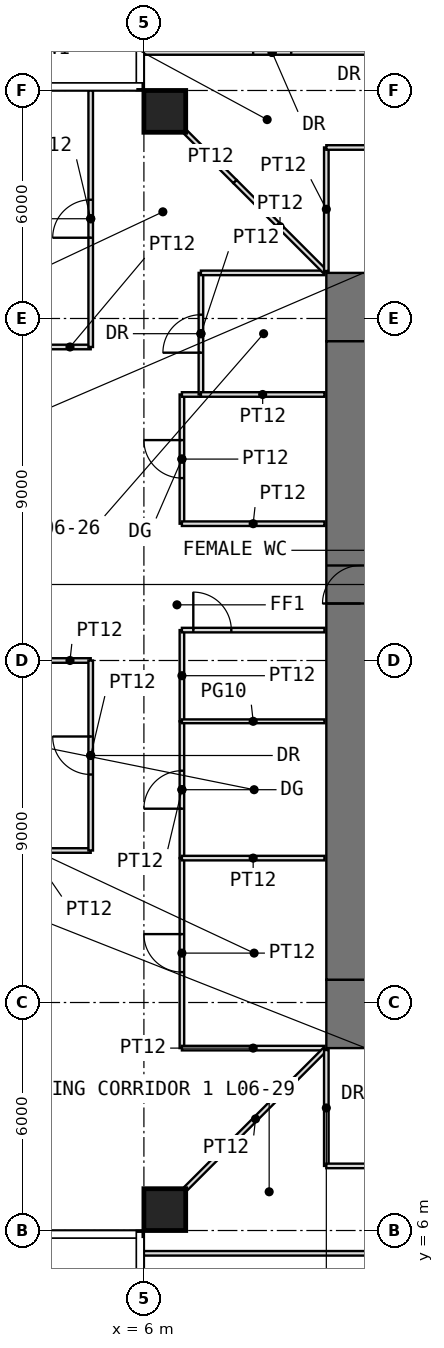
"""IFC4 building model, lengths in metres.
Left out: names, types, materials, properties, quantities, classifications, styles, units other than length and angle.
Written with IfcOpenShell. Run it as: python <this file> out.ifc"""

import sys

from ifc_helpers import new_model, si_unit, direction, frame, frame_2d, origin, origin_2d, place, context, subcontext, project, spatial, rectangle, extrude, element, fill, save


model = new_model("IFC4")
c1 = context("Model", 3, precision=1e-05, world=origin(), true_north=direction((0.0, 1.0)))
c2 = subcontext(c1, "Body", "Model", "MODEL_VIEW")
j1 = project(units=[si_unit("LENGTHUNIT", "METRE"), si_unit("PLANEANGLEUNIT", "RADIAN")], contexts=[c1])
p1 = place(None, origin())
s1 = spatial("IfcSite", under=j1, at=p1, CompositionType="ELEMENT")
p2 = place(p1, origin())
s2 = spatial("IfcBuilding", under=s1, at=p2, CompositionType="ELEMENT")
p3 = place(p2, frame((0.0, 0.0, 30.5)))
s3 = spatial("IfcBuildingStorey", under=s2, at=p3, CompositionType="ELEMENT", Elevation=30.5)
for number, where, z_axis, x_axis in (
    (1, (6.55, 6.55, 0.0), (0.0, 0.0, 1.0), (1.0, 0.0, 0.0)),
    (2, (6.55, 35.45, 0.0), (0.0, 0.0, 1.0), (1.0, 0.0, 0.0)),
):
    element("IfcColumn", number, at=place(p3, frame(where, z_axis=z_axis, x_axis=x_axis)), inside=s3, PredefinedType="COLUMN", context=c2, shape_type="SweptSolid", body=[
        extrude(rectangle(XDim=1.1, YDim=1.1, at=origin_2d()), origin(), (0.0, 0.0, 1.0), 4.0),
    ])
p4 = place(p3, frame((10.8, 11.7, -0.05), z_axis=(0.0, 0.0, 1.0), x_axis=(1.0, 0.0, 0.0)))
e3 = element("IfcWall", 3, at=p4, inside=s3, PredefinedType="SHEAR", context=c2, shape_type="SweptSolid", body=[
    extrude(rectangle(XDim=20.4, YDim=1.8, at=frame_2d((10.2, 0.0))), origin(), (0.0, 0.0, 1.0), 4.0),
])
p5 = place(p4, frame((9.2, 0.0, 0.05)))
e4 = element("IfcOpeningElement", 4, at=p5, cuts=e3, PredefinedType="OPENING", context=c2, shape_type="SweptSolid", body=[
    extrude(rectangle(XDim=2.0, YDim=2.2, at=frame_2d((1.0, 1.1))), frame((0.0, 0.91, 0.0), z_axis=(0.0, -1.0, 0.0), x_axis=(1.0, 0.0, 0.0)), (0.0, 0.0, 1.0), 1.82),
])
p6 = place(p3, frame((10.8, 30.3, -0.05), z_axis=(0.0, 0.0, 1.0), x_axis=(1.0, 0.0, 0.0)))
e5 = element("IfcWall", 5, at=p6, inside=s3, PredefinedType="SHEAR", context=c2, shape_type="SweptSolid", body=[
    extrude(rectangle(XDim=20.4, YDim=1.8, at=frame_2d((10.2, 0.0))), origin(), (0.0, 0.0, 1.0), 4.0),
])
p7 = place(p6, frame((9.2, 0.0, 0.05)))
e6 = element("IfcOpeningElement", 6, at=p7, cuts=e5, PredefinedType="OPENING", context=c2, shape_type="SweptSolid", body=[
    extrude(rectangle(XDim=2.0, YDim=2.2, at=frame_2d((1.0, 1.1))), frame((0.0, 0.91, 0.0), z_axis=(0.0, -1.0, 0.0), x_axis=(1.0, 0.0, 0.0)), (0.0, 0.0, 1.0), 1.82),
])
p8 = place(p3, frame((11.7, 12.6, -0.05), z_axis=(0.0, 0.0, 1.0), x_axis=(0.0, 1.0, 0.0)))
e7 = element("IfcWall", 7, at=p8, inside=s3, PredefinedType="SHEAR", context=c2, shape_type="SweptSolid", body=[
    extrude(rectangle(XDim=16.8, YDim=1.8, at=frame_2d((8.4, 0.0))), origin(), (0.0, 0.0, 1.0), 4.0),
])
p9 = place(p8, frame((9.9, 0.0, 0.05)))
e8 = element("IfcOpeningElement", 8, at=p9, cuts=e7, PredefinedType="OPENING", context=c2, shape_type="SweptSolid", body=[
    extrude(rectangle(XDim=1.0, YDim=2.2, at=frame_2d((0.5, 1.1))), frame((0.0, 0.91, 0.0), z_axis=(0.0, -1.0, 0.0), x_axis=(1.0, 0.0, 0.0)), (0.0, 0.0, 1.0), 1.82),
])
p10 = place(p3, frame((1.41, 16.0, 0.0), z_axis=(0.0, 0.0, 1.0), x_axis=(1.0, 0.0, 0.0)))
e9 = element("IfcWall", 9, at=p10, inside=s3, PredefinedType="PARTITIONING", context=c2, shape_type="SweptSolid", body=[
    extrude(rectangle(XDim=3.19, YDim=0.12, at=frame_2d((1.595, 0.0))), origin(), (0.0, 0.0, 1.0), 3.75),
])
for number, where, z_axis, x_axis in (
    (10, (3.51, 21.0, 0.0), (0.0, 0.0, 1.0), (1.0, 0.0, 0.0)),
    (11, (3.51, 29.25, 0.0), (0.0, 0.0, 1.0), (1.0, 0.0, 0.0)),
):
    element("IfcWall", number, at=place(p3, frame(where, z_axis=z_axis, x_axis=x_axis)), inside=s3, PredefinedType="PARTITIONING", context=c2, shape_type="SweptSolid", body=[
        extrude(rectangle(XDim=1.09, YDim=0.12, at=frame_2d((0.545, 0.0))), origin(), (0.0, 0.0, 1.0), 3.75),
    ])
p11 = place(p3, frame((4.6, 16.0, 0.0), z_axis=(0.0, 0.0, 1.0), x_axis=(0.0, 1.0, 0.0)))
e12 = element("IfcWall", 12, at=p11, inside=s3, PredefinedType="PARTITIONING", context=c2, shape_type="SweptSolid", body=[
    extrude(rectangle(XDim=5.0, YDim=0.12, at=frame_2d((2.5, 0.0))), origin(), (0.0, 0.0, 1.0), 3.75),
])
p12 = place(p11, frame((2.0, 0.0, 0.0)))
e13 = element("IfcOpeningElement", 13, at=p12, cuts=e12, PredefinedType="OPENING", context=c2, shape_type="SweptSolid", body=[
    extrude(rectangle(XDim=1.0, YDim=2.2, at=frame_2d((0.5, 1.1))), frame((0.0, 0.07, 0.0), z_axis=(0.0, -1.0, 0.0), x_axis=(1.0, 0.0, 0.0)), (0.0, 0.0, 1.0), 0.14),
])
p13 = place(p3, frame((4.6, 29.25, 0.0), z_axis=(0.0, 0.0, 1.0), x_axis=(0.0, 1.0, 0.0)))
e14 = element("IfcWall", 14, at=p13, inside=s3, PredefinedType="PARTITIONING", context=c2, shape_type="SweptSolid", body=[
    extrude(rectangle(XDim=6.75, YDim=0.12, at=frame_2d((3.375, 0.0))), origin(), (0.0, 0.0, 1.0), 3.75),
])
p14 = place(p13, frame((2.875, 0.0, 0.0)))
e15 = element("IfcOpeningElement", 15, at=p14, cuts=e14, PredefinedType="OPENING", context=c2, shape_type="SweptSolid", body=[
    extrude(rectangle(XDim=1.0, YDim=2.2, at=frame_2d((0.5, 1.1))), frame((0.0, 0.07, 0.0), z_axis=(0.0, -1.0, 0.0), x_axis=(1.0, 0.0, 0.0)), (0.0, 0.0, 1.0), 0.14),
])
p15 = place(p3, frame((6.0, 5.4, 0.0), z_axis=(0.0, 0.0, 1.0), x_axis=(1.0, 0.0, 0.0)))
e16 = element("IfcWall", 16, at=p15, inside=s3, PredefinedType="PARTITIONING", context=c2, shape_type="SweptSolid", body=[
    extrude(rectangle(XDim=27.0, YDim=0.12, at=frame_2d((13.5, 0.0))), origin(), (0.0, 0.0, 1.0), 3.75),
])
p16 = place(p15, frame((14.8, 0.0, 0.0)))
e17 = element("IfcOpeningElement", 17, at=p16, cuts=e16, PredefinedType="OPENING", context=c2, shape_type="SweptSolid", body=[
    extrude(rectangle(XDim=1.0, YDim=2.4, at=frame_2d((0.5, 1.2))), frame((0.0, 0.07, 0.0), z_axis=(0.0, -1.0, 0.0), x_axis=(1.0, 0.0, 0.0)), (0.0, 0.0, 1.0), 0.14),
])
p17 = place(p3, frame((6.0, 37.0, 0.0), z_axis=(0.0, 0.0, 1.0), x_axis=(1.0, 0.0, 0.0)))
e18 = element("IfcWall", 18, at=p17, inside=s3, PredefinedType="PARTITIONING", context=c2, shape_type="SweptSolid", body=[
    extrude(rectangle(XDim=6.75, YDim=0.12, at=frame_2d((3.375, 0.0))), origin(), (0.0, 0.0, 1.0), 3.75),
])
p18 = place(p17, frame((2.875, 0.0, 0.0)))
e19 = element("IfcOpeningElement", 19, at=p18, cuts=e18, PredefinedType="OPENING", context=c2, shape_type="SweptSolid", body=[
    extrude(rectangle(XDim=1.0, YDim=2.2, at=frame_2d((0.5, 1.1))), frame((0.0, 0.07, 0.0), z_axis=(0.0, -1.0, 0.0), x_axis=(1.0, 0.0, 0.0)), (0.0, 0.0, 1.0), 0.14),
])
p19 = place(p3, frame((7.0, 10.8, 0.0), z_axis=(0.0, 0.0, 1.0), x_axis=(0.0, 1.0, 0.0)))
e20 = element("IfcWall", 20, at=p19, inside=s3, PredefinedType="PARTITIONING", context=c2, shape_type="SweptSolid", body=[
    extrude(rectangle(XDim=5.0, YDim=0.12, at=frame_2d((2.5, 0.0))), origin(), (0.0, 0.0, 1.0), 3.75),
])
p20 = place(p19, frame((2.0, 0.0, 0.0)))
e21 = element("IfcOpeningElement", 21, at=p20, cuts=e20, PredefinedType="OPENING", context=c2, shape_type="SweptSolid", body=[
    extrude(rectangle(XDim=1.0, YDim=2.2, at=frame_2d((0.5, 1.1))), frame((0.0, 0.07, 0.0), z_axis=(0.0, -1.0, 0.0), x_axis=(1.0, 0.0, 0.0)), (0.0, 0.0, 1.0), 0.14),
])
p21 = place(p3, frame((7.0, 10.8, 0.0), z_axis=(0.0, 0.0, 1.0), x_axis=(1.0, 0.0, 0.0)))
e22 = element("IfcWall", 22, at=p21, inside=s3, PredefinedType="PARTITIONING", context=c2, shape_type="SweptSolid", body=[
    extrude(rectangle(XDim=3.75, YDim=0.12, at=frame_2d((1.875, 0.0))), origin(), (0.0, 0.0, 1.0), 3.75),
])
p22 = place(p3, frame((7.0, 15.8, 0.0), z_axis=(0.0, 0.0, 1.0), x_axis=(0.0, 1.0, 0.0)))
e23 = element("IfcWall", 23, at=p22, inside=s3, PredefinedType="PARTITIONING", context=c2, shape_type="SweptSolid", body=[
    extrude(rectangle(XDim=3.6, YDim=0.12, at=frame_2d((1.8, 0.0))), origin(), (0.0, 0.0, 1.0), 3.75),
])
p23 = place(p22, frame((1.3, 0.0, 0.0)))
e24 = element("IfcOpeningElement", 24, at=p23, cuts=e23, PredefinedType="OPENING", context=c2, shape_type="SweptSolid", body=[
    extrude(rectangle(XDim=1.0, YDim=2.4, at=frame_2d((0.5, 1.2))), frame((0.0, 0.07, 0.0), z_axis=(0.0, -1.0, 0.0), x_axis=(1.0, 0.0, 0.0)), (0.0, 0.0, 1.0), 0.14),
])
p24 = place(p3, frame((7.0, 15.8, 0.0), z_axis=(0.0, 0.0, 1.0), x_axis=(1.0, 0.0, 0.0)))
e25 = element("IfcWall", 25, at=p24, inside=s3, PredefinedType="PARTITIONING", context=c2, shape_type="SweptSolid", body=[
    extrude(rectangle(XDim=3.75, YDim=0.12, at=frame_2d((1.875, 0.0))), origin(), (0.0, 0.0, 1.0), 3.75),
])
p25 = place(p3, frame((7.0, 19.4, 0.0), z_axis=(0.0, 0.0, 1.0), x_axis=(0.0, 1.0, 0.0)))
e26 = element("IfcWall", 26, at=p25, inside=s3, PredefinedType="PARTITIONING", context=c2, shape_type="SweptSolid", body=[
    extrude(rectangle(XDim=2.4, YDim=0.12, at=frame_2d((1.2, 0.0))), origin(), (0.0, 0.0, 1.0), 3.75),
])
p26 = place(p3, frame((7.0, 19.4, 0.0), z_axis=(0.0, 0.0, 1.0), x_axis=(1.0, 0.0, 0.0)))
e27 = element("IfcWall", 27, at=p26, inside=s3, PredefinedType="PARTITIONING", context=c2, shape_type="SweptSolid", body=[
    extrude(rectangle(XDim=3.75, YDim=0.1, at=frame_2d((1.875, 0.0))), origin(), (0.0, 0.0, 1.0), 3.75),
])
p27 = place(p3, frame((7.0, 21.8, 0.0), z_axis=(0.0, 0.0, 1.0), x_axis=(1.0, 0.0, 0.0)))
e28 = element("IfcWall", 28, at=p27, inside=s3, PredefinedType="PARTITIONING", context=c2, shape_type="SweptSolid", body=[
    extrude(rectangle(XDim=3.75, YDim=0.12, at=frame_2d((1.875, 0.0))), origin(), (0.0, 0.0, 1.0), 3.75),
])
p28 = place(p27, frame((0.3, 0.0, 0.0)))
e29 = element("IfcOpeningElement", 29, at=p28, cuts=e28, PredefinedType="OPENING", context=c2, shape_type="SweptSolid", body=[
    extrude(rectangle(XDim=1.0, YDim=2.4, at=frame_2d((0.5, 1.2))), frame((0.0, 0.07, 0.0), z_axis=(0.0, -1.0, 0.0), x_axis=(1.0, 0.0, 0.0)), (0.0, 0.0, 1.0), 0.14),
])
p29 = place(p3, frame((7.0, 24.6, 0.0), z_axis=(0.0, 0.0, 1.0), x_axis=(0.0, 1.0, 0.0)))
e30 = element("IfcWall", 30, at=p29, inside=s3, PredefinedType="PARTITIONING", context=c2, shape_type="SweptSolid", body=[
    extrude(rectangle(XDim=3.4, YDim=0.12, at=frame_2d((1.7, 0.0))), origin(), (0.0, 0.0, 1.0), 3.75),
])
p30 = place(p29, frame((1.2, 0.0, 0.0)))
e31 = element("IfcOpeningElement", 31, at=p30, cuts=e30, PredefinedType="OPENING", context=c2, shape_type="SweptSolid", body=[
    extrude(rectangle(XDim=1.0, YDim=2.4, at=frame_2d((0.5, 1.2))), frame((0.0, 0.07, 0.0), z_axis=(0.0, -1.0, 0.0), x_axis=(1.0, 0.0, 0.0)), (0.0, 0.0, 1.0), 0.14),
])
p31 = place(p3, frame((7.0, 24.6, 0.0), z_axis=(0.0, 0.0, 1.0), x_axis=(1.0, 0.0, 0.0)))
e32 = element("IfcWall", 32, at=p31, inside=s3, PredefinedType="PARTITIONING", context=c2, shape_type="SweptSolid", body=[
    extrude(rectangle(XDim=3.75, YDim=0.12, at=frame_2d((1.875, 0.0))), origin(), (0.0, 0.0, 1.0), 3.75),
])
p32 = place(p3, frame((7.0, 28.0, 0.0), z_axis=(0.0, 0.0, 1.0), x_axis=(1.0, 0.0, 0.0)))
e33 = element("IfcWall", 33, at=p32, inside=s3, PredefinedType="PARTITIONING", context=c2, shape_type="SweptSolid", body=[
    extrude(rectangle(XDim=0.5, YDim=0.12, at=frame_2d((0.25, 0.0))), origin(), (0.0, 0.0, 1.0), 3.75),
])
p33 = place(p3, frame((7.11, 7.11, 0.0), z_axis=(0.0, 0.0, 1.0), x_axis=(0.707106781187, 0.707106781187, 0.0)))
e34 = element("IfcWall", 34, at=p33, inside=s3, PredefinedType="PARTITIONING", context=c2, shape_type="SweptSolid", body=[
    extrude(rectangle(XDim=5.168, YDim=0.12, at=frame_2d((2.584, 0.0))), origin(), (0.0, 0.0, 1.0), 3.75),
])
p34 = place(p3, frame((7.11, 34.89, 0.0), z_axis=(0.0, 0.0, 1.0), x_axis=(0.707106781187, -0.707106781187, 0.0)))
e35 = element("IfcWall", 35, at=p34, inside=s3, PredefinedType="PARTITIONING", context=c2, shape_type="SweptSolid", body=[
    extrude(rectangle(XDim=1.822, YDim=0.12, at=frame_2d((0.911, 0.0))), origin(), (0.0, 0.0, 1.0), 3.75),
])
p35 = place(p3, frame((7.5, 28.0, 0.0), z_axis=(0.0, 0.0, 1.0), x_axis=(0.0, 1.0, 0.0)))
e36 = element("IfcWall", 36, at=p35, inside=s3, PredefinedType="PARTITIONING", context=c2, shape_type="SweptSolid", body=[
    extrude(rectangle(XDim=3.2, YDim=0.12, at=frame_2d((1.6, 0.0))), origin(), (0.0, 0.0, 1.0), 3.75),
])
p36 = place(p35, frame((1.1, 0.0, 0.0)))
e37 = element("IfcOpeningElement", 37, at=p36, cuts=e36, PredefinedType="OPENING", context=c2, shape_type="SweptSolid", body=[
    extrude(rectangle(XDim=1.0, YDim=2.2, at=frame_2d((0.5, 1.1))), frame((0.0, 0.07, 0.0), z_axis=(0.0, -1.0, 0.0), x_axis=(1.0, 0.0, 0.0)), (0.0, 0.0, 1.0), 0.14),
])
for number, where, z_axis, x_axis in (
    (38, (7.5, 28.0, 0.0), (0.0, 0.0, 1.0), (1.0, 0.0, 0.0)),
    (39, (7.5, 31.2, 0.0), (0.0, 0.0, 1.0), (1.0, 0.0, 0.0)),
):
    element("IfcWall", number, at=place(p3, frame(where, z_axis=z_axis, x_axis=x_axis)), inside=s3, PredefinedType="PARTITIONING", context=c2, shape_type="SweptSolid", body=[
        extrude(rectangle(XDim=3.25, YDim=0.12, at=frame_2d((1.625, 0.0))), origin(), (0.0, 0.0, 1.0), 3.75),
    ])
p37 = place(p3, frame((8.398, 33.602, 0.0), z_axis=(0.0, 0.0, 1.0), x_axis=(0.707106781187, -0.707106781187, 0.0)))
e40 = element("IfcWall", 40, at=p37, inside=s3, PredefinedType="PARTITIONING", context=c2, shape_type="SweptSolid", body=[
    extrude(rectangle(XDim=3.346, YDim=0.12, at=frame_2d((1.673, 0.0))), origin(), (0.0, 0.0, 1.0), 3.75),
])
p38 = place(p3, frame((10.8, 7.7, 0.0), z_axis=(0.0, 0.0, 1.0), x_axis=(0.0, 1.0, 0.0)))
e41 = element("IfcWall", 41, at=p38, inside=s3, PredefinedType="PARTITIONING", context=c2, shape_type="SweptSolid", body=[
    extrude(rectangle(XDim=3.05, YDim=0.12, at=frame_2d((1.525, 0.0))), origin(), (0.0, 0.0, 1.0), 3.75),
])
p39 = place(p3, frame((10.8, 7.7, 0.0), z_axis=(0.0, 0.0, 1.0), x_axis=(1.0, 0.0, 0.0)))
e42 = element("IfcWall", 42, at=p39, inside=s3, PredefinedType="PARTITIONING", context=c2, shape_type="SweptSolid", body=[
    extrude(rectangle(XDim=3.6, YDim=0.12, at=frame_2d((1.8, 0.0))), origin(), (0.0, 0.0, 1.0), 3.75),
])
p40 = place(p39, frame((1.3, 0.0, 0.0)))
e43 = element("IfcOpeningElement", 43, at=p40, cuts=e42, PredefinedType="OPENING", context=c2, shape_type="SweptSolid", body=[
    extrude(rectangle(XDim=1.0, YDim=2.2, at=frame_2d((0.5, 1.1))), frame((0.0, 0.07, 0.0), z_axis=(0.0, -1.0, 0.0), x_axis=(1.0, 0.0, 0.0)), (0.0, 0.0, 1.0), 0.14),
])
p41 = place(p3, frame((10.8, 31.25, 0.0), z_axis=(0.0, 0.0, 1.0), x_axis=(0.0, 1.0, 0.0)))
e44 = element("IfcWall", 44, at=p41, inside=s3, PredefinedType="PARTITIONING", context=c2, shape_type="SweptSolid", body=[
    extrude(rectangle(XDim=3.25, YDim=0.12, at=frame_2d((1.625, 0.0))), origin(), (0.0, 0.0, 1.0), 3.75),
])
p42 = place(p3, frame((10.8, 34.5, 0.0), z_axis=(0.0, 0.0, 1.0), x_axis=(1.0, 0.0, 0.0)))
e45 = element("IfcWall", 45, at=p42, inside=s3, PredefinedType="PARTITIONING", context=c2, shape_type="SweptSolid", body=[
    extrude(rectangle(XDim=3.4, YDim=0.12, at=frame_2d((1.7, 0.0))), origin(), (0.0, 0.0, 1.0), 3.75),
])
p43 = place(p42, frame((1.2, 0.0, 0.0)))
e46 = element("IfcOpeningElement", 46, at=p43, cuts=e45, PredefinedType="OPENING", context=c2, shape_type="SweptSolid", body=[
    extrude(rectangle(XDim=1.0, YDim=2.2, at=frame_2d((0.5, 1.1))), frame((0.0, 0.07, 0.0), z_axis=(0.0, -1.0, 0.0), x_axis=(1.0, 0.0, 0.0)), (0.0, 0.0, 1.0), 0.14),
])
p44 = place(p9, origin())
e47 = element("IfcDoor", 47, at=p44, inside=s3, OperationType="SINGLE_SWING_LEFT", PredefinedType="DOOR", context=c2, shape_type="SweptSolid", body=[
    extrude(rectangle(XDim=1.0, YDim=2.2, at=frame_2d((0.5, 1.1))), frame((0.0, 0.025, 0.0), z_axis=(0.0, -1.0, 0.0), x_axis=(1.0, 0.0, 0.0)), (0.0, 0.0, 1.0), 0.05),
])
fill(e8, e47)
p45 = place(p18, origin())
e48 = element("IfcDoor", 48, at=p45, inside=s3, OperationType="SINGLE_SWING_RIGHT", PredefinedType="DOOR", context=c2, shape_type="SweptSolid", body=[
    extrude(rectangle(XDim=1.0, YDim=2.2, at=frame_2d((0.5, 1.1))), frame((0.0, 0.025, 0.0), z_axis=(0.0, -1.0, 0.0), x_axis=(1.0, 0.0, 0.0)), (0.0, 0.0, 1.0), 0.05),
])
fill(e19, e48)
p46 = place(p20, origin())
e49 = element("IfcDoor", 49, at=p46, inside=s3, OperationType="SINGLE_SWING_RIGHT", PredefinedType="DOOR", context=c2, shape_type="SweptSolid", body=[
    extrude(rectangle(XDim=1.0, YDim=2.2, at=frame_2d((0.5, 1.1))), frame((0.0, 0.025, 0.0), z_axis=(0.0, -1.0, 0.0), x_axis=(1.0, 0.0, 0.0)), (0.0, 0.0, 1.0), 0.05),
])
fill(e21, e49)
p47 = place(p23, origin())
e50 = element("IfcDoor", 50, at=p47, inside=s3, OperationType="SINGLE_SWING_LEFT", PredefinedType="DOOR", context=c2, shape_type="SweptSolid", body=[
    extrude(rectangle(XDim=1.0, YDim=2.4, at=frame_2d((0.5, 1.2))), frame((0.0, 0.025, 0.0), z_axis=(0.0, -1.0, 0.0), x_axis=(1.0, 0.0, 0.0)), (0.0, 0.0, 1.0), 0.05),
])
fill(e24, e50)
p48 = place(p30, origin())
e51 = element("IfcDoor", 51, at=p48, inside=s3, OperationType="SINGLE_SWING_RIGHT", PredefinedType="DOOR", context=c2, shape_type="SweptSolid", body=[
    extrude(rectangle(XDim=1.0, YDim=2.4, at=frame_2d((0.5, 1.2))), frame((0.0, 0.025, 0.0), z_axis=(0.0, -1.0, 0.0), x_axis=(1.0, 0.0, 0.0)), (0.0, 0.0, 1.0), 0.05),
])
fill(e31, e51)
p49 = place(p36, origin())
e52 = element("IfcDoor", 52, at=p49, inside=s3, OperationType="SINGLE_SWING_LEFT", PredefinedType="DOOR", context=c2, shape_type="SweptSolid", body=[
    extrude(rectangle(XDim=1.0, YDim=2.2, at=frame_2d((0.5, 1.1))), frame((0.0, 0.025, 0.0), z_axis=(0.0, -1.0, 0.0), x_axis=(1.0, 0.0, 0.0)), (0.0, 0.0, 1.0), 0.05),
])
fill(e37, e52)
p50 = place(p12, origin())
e53 = element("IfcDoor", 53, at=p50, inside=s3, OperationType="SINGLE_SWING_RIGHT", PredefinedType="DOOR", context=c2, shape_type="SweptSolid", body=[
    extrude(rectangle(XDim=1.0, YDim=2.2, at=frame_2d((0.5, 1.1))), frame((0.0, 0.025, 0.0), z_axis=(0.0, -1.0, 0.0), x_axis=(1.0, 0.0, 0.0)), (0.0, 0.0, 1.0), 0.05),
])
fill(e13, e53)
p51 = place(p14, origin())
e54 = element("IfcDoor", 54, at=p51, inside=s3, OperationType="SINGLE_SWING_LEFT", PredefinedType="DOOR", context=c2, shape_type="SweptSolid", body=[
    extrude(rectangle(XDim=1.0, YDim=2.2, at=frame_2d((0.5, 1.1))), frame((0.0, 0.025, 0.0), z_axis=(0.0, -1.0, 0.0), x_axis=(1.0, 0.0, 0.0)), (0.0, 0.0, 1.0), 0.05),
])
fill(e15, e54)
p52 = place(p28, origin())
e55 = element("IfcDoor", 55, at=p52, inside=s3, OperationType="SINGLE_SWING_LEFT", PredefinedType="DOOR", context=c2, shape_type="SweptSolid", body=[
    extrude(rectangle(XDim=1.0, YDim=2.4, at=frame_2d((0.5, 1.2))), frame((0.0, 0.025, 0.0), z_axis=(0.0, -1.0, 0.0), x_axis=(1.0, 0.0, 0.0)), (0.0, 0.0, 1.0), 0.05),
])
fill(e29, e55)
save(model, sys.argv[1])
